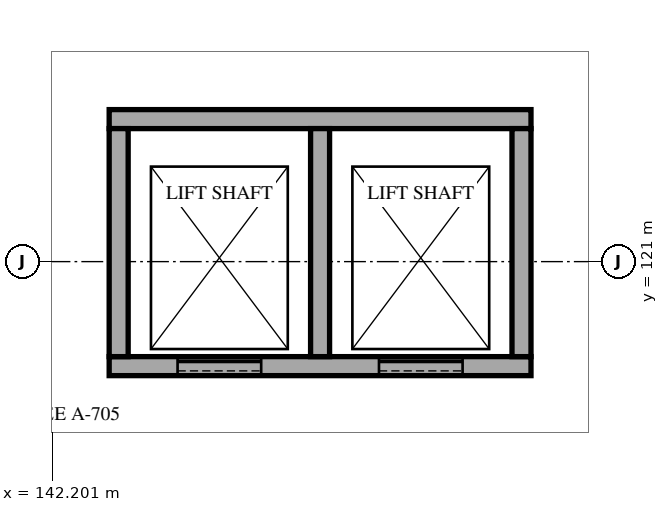
"""IFC4 building model, lengths in metres.
Left out: names, types, materials, properties, quantities, classifications, styles, units other than length and angle.
Written with IfcOpenShell. Run it as: python <this file> out.ifc"""

import sys

from ifc_helpers import new_model, si_unit, direction, frame, frame_2d, origin, place, context, subcontext, project, spatial, rectangle, extrude, element, fill, save


model = new_model("IFC4")
c1 = context("Model", 3, precision=1e-05, world=origin(), true_north=direction((0.0, 1.0)))
c2 = subcontext(c1, "Body", "Model", "MODEL_VIEW")
j1 = project(units=[si_unit("LENGTHUNIT", "METRE"), si_unit("PLANEANGLEUNIT", "RADIAN")], contexts=[c1])
p1 = place(None, origin())
s1 = spatial("IfcSite", under=j1, at=p1, CompositionType="ELEMENT")
p2 = place(p1, origin())
s2 = spatial("IfcBuilding", under=s1, at=p2, CompositionType="ELEMENT")
p3 = place(p2, frame((0.0, 0.0, -8.4)))
s3 = spatial("IfcBuildingStorey", under=s2, at=p3, CompositionType="ELEMENT", Elevation=-8.4)
p4 = place(p3, frame((142.95, 119.625, 0.0), z_axis=(0.0, 0.0, 1.0), x_axis=(1.0, 0.0, 0.0)))
e1 = element("IfcWall", 1, at=p4, inside=s3, PredefinedType="SHEAR", context=c2, shape_type="SweptSolid", body=[
    extrude(rectangle(XDim=5.55, YDim=0.25, at=frame_2d((2.775, 0.0))), origin(), (0.0, 0.0, 1.0), 4.2),
])
p5 = place(p4, frame((0.9, 0.0, 0.0)))
e2 = element("IfcOpeningElement", 2, at=p5, cuts=e1, PredefinedType="OPENING", context=c2, shape_type="SweptSolid", body=[
    extrude(rectangle(XDim=1.1, YDim=2.1, at=frame_2d((0.55, 1.05))), frame((0.0, 0.135, 0.0), z_axis=(0.0, -1.0, 0.0), x_axis=(1.0, 0.0, 0.0)), (0.0, 0.0, 1.0), 0.27),
])
p6 = place(p4, frame((3.55, 0.0, 0.0)))
e3 = element("IfcOpeningElement", 3, at=p6, cuts=e1, PredefinedType="OPENING", context=c2, shape_type="SweptSolid", body=[
    extrude(rectangle(XDim=1.1, YDim=2.1, at=frame_2d((0.55, 1.05))), frame((0.0, 0.135, 0.0), z_axis=(0.0, -1.0, 0.0), x_axis=(1.0, 0.0, 0.0)), (0.0, 0.0, 1.0), 0.27),
])
p7 = place(p3, frame((142.95, 122.875, 0.0), z_axis=(0.0, 0.0, 1.0), x_axis=(1.0, 0.0, 0.0)))
e4 = element("IfcWall", 4, at=p7, inside=s3, PredefinedType="SHEAR", context=c2, shape_type="SweptSolid", body=[
    extrude(rectangle(XDim=5.55, YDim=0.25, at=frame_2d((2.775, 0.0))), origin(), (0.0, 0.0, 1.0), 4.2),
])
for number, where, z_axis, x_axis in (
    (5, (143.075, 119.75, 0.0), (0.0, 0.0, 1.0), (0.0, 1.0, 0.0)),
    (6, (148.375, 119.75, 0.0), (0.0, 0.0, 1.0), (0.0, 1.0, 0.0)),
    (7, (145.725, 119.75, 0.0), (0.0, 0.0, 1.0), (0.0, 1.0, 0.0)),
):
    element("IfcWall", number, at=place(p3, frame(where, z_axis=z_axis, x_axis=x_axis)), inside=s3, PredefinedType="SHEAR", context=c2, shape_type="SweptSolid", body=[
        extrude(rectangle(XDim=3.0, YDim=0.25, at=frame_2d((1.5, 0.0))), origin(), (0.0, 0.0, 1.0), 4.2),
    ])
p8 = place(p5, origin())
e8 = element("IfcDoor", 8, at=p8, inside=s3, OperationType="DOUBLE_DOOR_SLIDING", PredefinedType="NOTDEFINED", context=c2, shape_type="SweptSolid", body=[
    extrude(rectangle(XDim=1.1, YDim=2.1, at=frame_2d((0.55, 1.05))), frame((0.0, 0.025, 0.0), z_axis=(0.0, -1.0, 0.0), x_axis=(1.0, 0.0, 0.0)), (0.0, 0.0, 1.0), 0.05),
])
fill(e2, e8)
p9 = place(p6, origin())
e9 = element("IfcDoor", 9, at=p9, inside=s3, OperationType="DOUBLE_DOOR_SLIDING", PredefinedType="NOTDEFINED", context=c2, shape_type="SweptSolid", body=[
    extrude(rectangle(XDim=1.1, YDim=2.1, at=frame_2d((0.55, 1.05))), frame((0.0, 0.025, 0.0), z_axis=(0.0, -1.0, 0.0), x_axis=(1.0, 0.0, 0.0)), (0.0, 0.0, 1.0), 0.05),
])
fill(e3, e9)
save(model, sys.argv[1])
